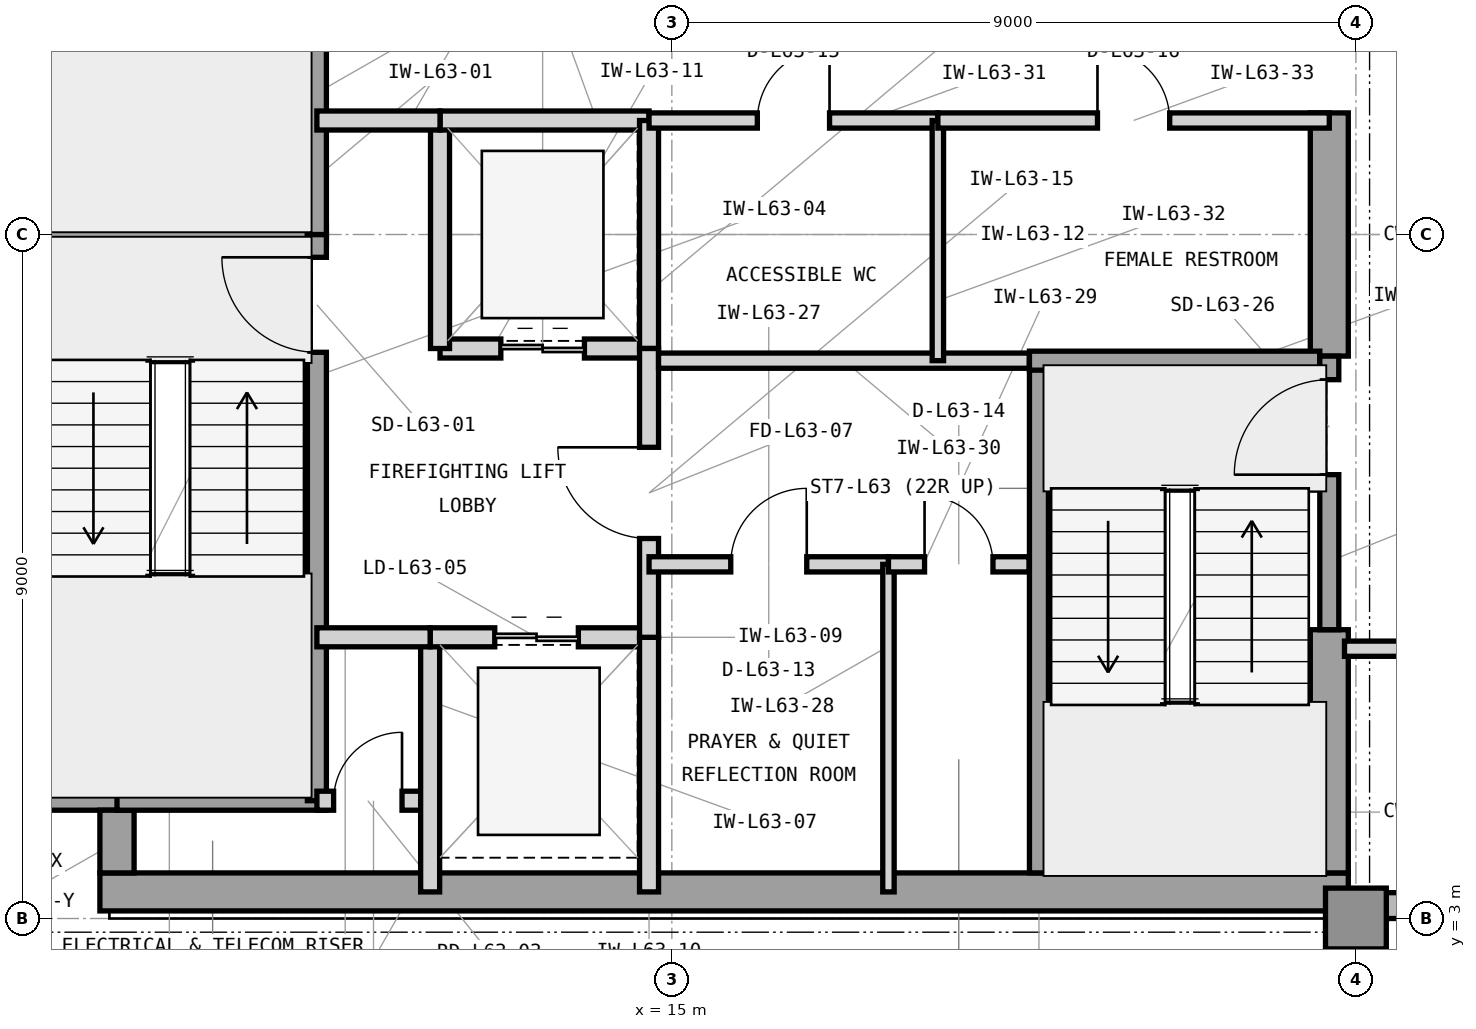
"""IFC4 building model, lengths in metres.
Left out: names, types, materials, properties, quantities, classifications, styles, units other than length and angle.
Written with IfcOpenShell. Run it as: python <this file> out.ifc"""

import sys

from ifc_helpers import new_model, si_unit, direction, frame, frame_2d, origin, origin_2d, place, context, subcontext, project, spatial, rectangle, extrude, element, fill, save


model = new_model("IFC4")
c1 = context("Model", 3, precision=1e-05, world=origin(), true_north=direction((0.0, 1.0)))
c2 = subcontext(c1, "Body", "Model", "MODEL_VIEW")
j1 = project(units=[si_unit("LENGTHUNIT", "METRE"), si_unit("PLANEANGLEUNIT", "RADIAN")], contexts=[c1])
p1 = place(None, origin())
s1 = spatial("IfcSite", under=j1, at=p1, CompositionType="ELEMENT")
p2 = place(p1, origin())
s2 = spatial("IfcBuilding", under=s1, at=p2, CompositionType="ELEMENT")
p3 = place(p2, frame((0.0, 0.0, 258.6)))
s3 = spatial("IfcBuildingStorey", under=s2, at=p3, CompositionType="ELEMENT", Elevation=258.6)
p4 = place(p3, frame((7.475, 3.35, 0.0), z_axis=(0.0, 0.0, 1.0), x_axis=(1.0, 0.0, 0.0)))
e1 = element("IfcWall", 1, at=p4, inside=s3, PredefinedType="SHEAR", context=c2, shape_type="SweptSolid", body=[
    extrude(rectangle(XDim=16.425, YDim=0.5, at=frame_2d((8.212, 0.0))), origin(), (0.0, 0.0, 1.0), 3.9),
])
p5 = place(p3, frame((23.65, 3.6, 0.0), z_axis=(0.0, 0.0, 1.0), x_axis=(0.0, 1.0, 0.0)))
e2 = element("IfcWall", 2, at=p5, inside=s3, PredefinedType="SHEAR", context=c2, shape_type="SweptSolid", body=[
    extrude(rectangle(XDim=3.2, YDim=0.5, at=frame_2d((1.6, 0.0))), origin(), (0.0, 0.0, 1.0), 3.9),
])
p6 = place(p3, frame((23.65, 10.4, 0.0), z_axis=(0.0, 0.0, 1.0), x_axis=(0.0, 1.0, 0.0)))
e3 = element("IfcWall", 3, at=p6, inside=s3, PredefinedType="SHEAR", context=c2, shape_type="SweptSolid", body=[
    extrude(rectangle(XDim=3.2, YDim=0.5, at=frame_2d((1.6, 0.0))), origin(), (0.0, 0.0, 1.0), 3.9),
])
p7 = place(p3, frame((6.6, 4.65, 0.0), z_axis=(0.0, 0.0, 1.0), x_axis=(1.0, 0.0, 0.0)))
e4 = element("IfcWall", 4, at=p7, inside=s3, PredefinedType="SHEAR", context=c2, shape_type="SweptSolid", body=[
    extrude(rectangle(XDim=1.325, YDim=0.45, at=frame_2d((0.663, 0.0))), origin(), (0.0, 0.0, 1.0), 3.9),
])
p8 = place(p3, frame((7.7, 3.6, 0.0), z_axis=(0.0, 0.0, 1.0), x_axis=(0.0, 1.0, 0.0)))
e5 = element("IfcWall", 5, at=p8, inside=s3, PredefinedType="SHEAR", context=c2, shape_type="SweptSolid", body=[
    extrude(rectangle(XDim=0.825, YDim=0.45, at=frame_2d((0.413, 0.0))), origin(), (0.0, 0.0, 1.0), 3.9),
])
p9 = place(p3, frame((24.0, 3.0, 0.0), z_axis=(0.0, 0.0, 1.0), x_axis=(1.0, 0.0, 0.0)))
e6 = element("IfcColumn", 6, at=p9, inside=s3, PredefinedType="COLUMN", context=c2, shape_type="SweptSolid", body=[
    extrude(rectangle(XDim=0.8, YDim=0.8, at=origin_2d()), origin(), (0.0, 0.0, 1.0), 3.9),
])
p10 = place(p3, frame((23.9, 3.17, 0.0), z_axis=(0.0, 0.0, 1.0), x_axis=(1.0, 0.0, 0.0)))
e7 = element("IfcWall", 7, at=p10, inside=s3, PredefinedType="STANDARD", context=c2, shape_type="SweptSolid", body=[
    extrude(rectangle(XDim=28.5, YDim=0.34, at=frame_2d((14.25, 0.0))), origin(), (0.0, 0.0, 1.0), 3.715),
])
p11 = place(p10, frame((1.425, 0.0, 0.8)))
e8 = element("IfcOpeningElement", 8, at=p11, cuts=e7, PredefinedType="OPENING", context=c2, shape_type="SweptSolid", body=[
    extrude(rectangle(XDim=1.9, YDim=2.35, at=frame_2d((0.95, 1.175))), frame((0.0, 0.18, 0.0), z_axis=(0.0, -1.0, 0.0), x_axis=(1.0, 0.0, 0.0)), (0.0, 0.0, 1.0), 0.36),
])
p12 = place(p10, frame((10.575, 0.0, 0.8)))
e9 = element("IfcOpeningElement", 9, at=p12, cuts=e7, PredefinedType="OPENING", context=c2, shape_type="SweptSolid", body=[
    extrude(rectangle(XDim=2.6, YDim=2.35, at=frame_2d((1.3, 1.175))), frame((0.0, 0.18, 0.0), z_axis=(0.0, -1.0, 0.0), x_axis=(1.0, 0.0, 0.0)), (0.0, 0.0, 1.0), 0.36),
])
p13 = place(p10, frame((20.075, 0.0, 0.8)))
e10 = element("IfcOpeningElement", 10, at=p13, cuts=e7, PredefinedType="OPENING", context=c2, shape_type="SweptSolid", body=[
    extrude(rectangle(XDim=2.6, YDim=2.35, at=frame_2d((1.3, 1.175))), frame((0.0, 0.18, 0.0), z_axis=(0.0, -1.0, 0.0), x_axis=(1.0, 0.0, 0.0)), (0.0, 0.0, 1.0), 0.36),
])
p14 = place(p3, frame((6.35, 12.0, 0.0), z_axis=(0.0, 0.0, 1.0), x_axis=(1.0, 0.0, 0.0)))
e11 = element("IfcWall", 11, at=p14, inside=s3, PredefinedType="SHEAR", context=c2, shape_type="SweptSolid", body=[
    extrude(rectangle(XDim=4.105, YDim=0.25, at=frame_2d((2.052, 0.0))), origin(), (0.0, 0.0, 1.0), 3.9),
])
p15 = place(p3, frame((7.7, 4.55, 0.0), z_axis=(0.0, 0.0, 1.0), x_axis=(1.0, 0.0, 0.0)))
e12 = element("IfcWall", 12, at=p15, inside=s3, PredefinedType="SHEAR", context=c2, shape_type="SweptSolid", body=[
    extrude(rectangle(XDim=2.755, YDim=0.25, at=frame_2d((1.377, 0.0))), origin(), (0.0, 0.0, 1.0), 3.9),
])
p16 = place(p3, frame((10.33, 4.55, 0.0), z_axis=(0.0, 0.0, 1.0), x_axis=(0.0, 1.0, 0.0)))
e13 = element("IfcWall", 13, at=p16, inside=s3, PredefinedType="SHEAR", context=c2, shape_type="SweptSolid", body=[
    extrude(rectangle(XDim=7.45, YDim=0.25, at=frame_2d((3.725, 0.0))), origin(), (0.0, 0.0, 1.0), 3.9),
])
p17 = place(p16, frame((5.9, 0.0, 0.0)))
e14 = element("IfcOpeningElement", 14, at=p17, cuts=e13, PredefinedType="OPENING", context=c2, shape_type="SweptSolid", body=[
    extrude(rectangle(XDim=1.25, YDim=2.2, at=frame_2d((0.625, 1.1))), frame((0.0, 0.135, 0.0), z_axis=(0.0, -1.0, 0.0), x_axis=(1.0, 0.0, 0.0)), (0.0, 0.0, 1.0), 0.27),
])
p18 = place(p3, frame((10.33, 12.0, 0.0), z_axis=(0.0, 0.0, 1.0), x_axis=(0.0, 1.0, 0.0)))
e15 = element("IfcWall", 15, at=p18, inside=s3, PredefinedType="SHEAR", context=c2, shape_type="SweptSolid", body=[
    extrude(rectangle(XDim=7.45, YDim=0.25, at=frame_2d((3.725, 0.0))), origin(), (0.0, 0.0, 1.0), 3.9),
])
p19 = place(p18, frame((5.85, 0.0, 0.0)))
e16 = element("IfcOpeningElement", 16, at=p19, cuts=e15, PredefinedType="OPENING", context=c2, shape_type="SweptSolid", body=[
    extrude(rectangle(XDim=1.25, YDim=2.2, at=frame_2d((0.625, 1.1))), frame((0.0, 0.135, 0.0), z_axis=(0.0, -1.0, 0.0), x_axis=(1.0, 0.0, 0.0)), (0.0, 0.0, 1.0), 0.27),
])
p20 = place(p3, frame((10.33, 4.55, 0.0), z_axis=(0.0, 0.0, 1.0), x_axis=(1.0, 0.0, 0.0)))
e17 = element("IfcWall", 17, at=p20, inside=s3, PredefinedType="PARTITIONING", context=c2, shape_type="SweptSolid", body=[
    extrude(rectangle(XDim=1.49, YDim=0.25, at=frame_2d((0.745, 0.0))), origin(), (0.0, 0.0, 1.0), 3.705),
])
p21 = place(p20, frame((0.22, 0.0, 0.0)))
e18 = element("IfcOpeningElement", 18, at=p21, cuts=e17, PredefinedType="OPENING", context=c2, shape_type="SweptSolid", body=[
    extrude(rectangle(XDim=0.9, YDim=2.1, at=frame_2d((0.45, 1.05))), frame((0.0, 0.135, 0.0), z_axis=(0.0, -1.0, 0.0), x_axis=(1.0, 0.0, 0.0)), (0.0, 0.0, 1.0), 0.27),
])
p22 = place(p3, frame((11.82, 3.35, 0.0), z_axis=(0.0, 0.0, 1.0), x_axis=(0.0, 1.0, 0.0)))
e19 = element("IfcWall", 19, at=p22, inside=s3, PredefinedType="PARTITIONING", context=c2, shape_type="SweptSolid", body=[
    extrude(rectangle(XDim=3.35, YDim=0.25, at=frame_2d((1.675, 0.0))), origin(), (0.0, 0.0, 1.0), 3.705),
])
p23 = place(p3, frame((11.82, 6.7, 0.0), z_axis=(0.0, 0.0, 1.0), x_axis=(1.0, 0.0, 0.0)))
e20 = element("IfcWall", 20, at=p23, inside=s3, PredefinedType="PARTITIONING", context=c2, shape_type="SweptSolid", body=[
    extrude(rectangle(XDim=2.88, YDim=0.25, at=frame_2d((1.44, 0.0))), origin(), (0.0, 0.0, 1.0), 3.088),
])
p24 = place(p23, frame((0.85, 0.0, 0.0)))
e21 = element("IfcOpeningElement", 21, at=p24, cuts=e20, PredefinedType="OPENING", context=c2, shape_type="SweptSolid", body=[
    extrude(rectangle(XDim=1.1, YDim=2.25, at=frame_2d((0.55, 1.125))), frame((0.0, 0.135, 0.0), z_axis=(0.0, -1.0, 0.0), x_axis=(1.0, 0.0, 0.0)), (0.0, 0.0, 1.0), 0.27),
])
p25 = place(p3, frame((14.7, 3.35, 0.0), z_axis=(0.0, 0.0, 1.0), x_axis=(0.0, 1.0, 0.0)))
e22 = element("IfcWall", 22, at=p25, inside=s3, PredefinedType="PARTITIONING", context=c2, shape_type="SweptSolid", body=[
    extrude(rectangle(XDim=3.35, YDim=0.25, at=frame_2d((1.675, 0.0))), origin(), (0.0, 0.0, 1.0), 3.705),
])
p26 = place(p3, frame((11.95, 10.5, 0.0), z_axis=(0.0, 0.0, 1.0), x_axis=(1.0, 0.0, 0.0)))
e23 = element("IfcWall", 23, at=p26, inside=s3, PredefinedType="PARTITIONING", context=c2, shape_type="SweptSolid", body=[
    extrude(rectangle(XDim=2.75, YDim=0.25, at=frame_2d((1.375, 0.0))), origin(), (0.0, 0.0, 1.0), 3.088),
])
p27 = place(p26, frame((0.8, 0.0, 0.0)))
e24 = element("IfcOpeningElement", 24, at=p27, cuts=e23, PredefinedType="OPENING", context=c2, shape_type="SweptSolid", body=[
    extrude(rectangle(XDim=1.1, YDim=2.25, at=frame_2d((0.55, 1.125))), frame((0.0, 0.135, 0.0), z_axis=(0.0, -1.0, 0.0), x_axis=(1.0, 0.0, 0.0)), (0.0, 0.0, 1.0), 0.27),
])
p28 = place(p3, frame((11.95, 10.5, 0.0), z_axis=(0.0, 0.0, 1.0), x_axis=(0.0, 1.0, 0.0)))
e25 = element("IfcWall", 25, at=p28, inside=s3, PredefinedType="PARTITIONING", context=c2, shape_type="SweptSolid", body=[
    extrude(rectangle(XDim=3.0, YDim=0.25, at=frame_2d((1.5, 0.0))), origin(), (0.0, 0.0, 1.0), 3.705),
])
p29 = place(p3, frame((11.95, 13.5, 0.0), z_axis=(0.0, 0.0, 1.0), x_axis=(1.0, 0.0, 0.0)))
e26 = element("IfcWall", 26, at=p29, inside=s3, PredefinedType="PARTITIONING", context=c2, shape_type="SweptSolid", body=[
    extrude(rectangle(XDim=2.75, YDim=0.25, at=frame_2d((1.375, 0.0))), origin(), (0.0, 0.0, 1.0), 3.088),
])
p30 = place(p3, frame((14.7, 10.5, 0.0), z_axis=(0.0, 0.0, 1.0), x_axis=(0.0, 1.0, 0.0)))
e27 = element("IfcWall", 27, at=p30, inside=s3, PredefinedType="PARTITIONING", context=c2, shape_type="SweptSolid", body=[
    extrude(rectangle(XDim=3.0, YDim=0.25, at=frame_2d((1.5, 0.0))), origin(), (0.0, 0.0, 1.0), 3.705),
])
p31 = place(p3, frame((14.7, 6.7, 0.0), z_axis=(0.0, 0.0, 1.0), x_axis=(0.0, 1.0, 0.0)))
e28 = element("IfcWall", 28, at=p31, inside=s3, PredefinedType="PARTITIONING", context=c2, shape_type="SweptSolid", body=[
    extrude(rectangle(XDim=3.8, YDim=0.25, at=frame_2d((1.9, 0.0))), origin(), (0.0, 0.0, 1.0), 3.705),
])
p32 = place(p31, frame((1.3, 0.0, 0.0)))
e29 = element("IfcOpeningElement", 29, at=p32, cuts=e28, PredefinedType="OPENING", context=c2, shape_type="SweptSolid", body=[
    extrude(rectangle(XDim=1.2, YDim=2.2, at=frame_2d((0.6, 1.1))), frame((0.0, 0.135, 0.0), z_axis=(0.0, -1.0, 0.0), x_axis=(1.0, 0.0, 0.0)), (0.0, 0.0, 1.0), 0.27),
])
p33 = place(p3, frame((10.33, 13.5, 0.0), z_axis=(0.0, 0.0, 1.0), x_axis=(1.0, 0.0, 0.0)))
e30 = element("IfcWall", 30, at=p33, inside=s3, PredefinedType="PARTITIONING", context=c2, shape_type="SweptSolid", body=[
    extrude(rectangle(XDim=1.62, YDim=0.25, at=frame_2d((0.81, 0.0))), origin(), (0.0, 0.0, 1.0), 3.088),
])
p34 = place(p3, frame((10.33, 6.7, 0.0), z_axis=(0.0, 0.0, 1.0), x_axis=(1.0, 0.0, 0.0)))
e31 = element("IfcWall", 31, at=p34, inside=s3, PredefinedType="PARTITIONING", context=c2, shape_type="SweptSolid", body=[
    extrude(rectangle(XDim=1.49, YDim=0.25, at=frame_2d((0.745, 0.0))), origin(), (0.0, 0.0, 1.0), 3.088),
])
p35 = place(p3, frame((14.7, 7.66, 0.0), z_axis=(0.0, 0.0, 1.0), x_axis=(1.0, 0.0, 0.0)))
e32 = element("IfcWall", 32, at=p35, inside=s3, PredefinedType="PARTITIONING", context=c2, shape_type="SweptSolid", body=[
    extrude(rectangle(XDim=3.15, YDim=0.2, at=frame_2d((1.575, 0.0))), origin(), (0.0, 0.0, 1.0), 3.705),
])
p36 = place(p35, frame((1.075, 0.0, 0.0)))
e33 = element("IfcOpeningElement", 33, at=p36, cuts=e32, PredefinedType="OPENING", context=c2, shape_type="SweptSolid", body=[
    extrude(rectangle(XDim=1.0, YDim=2.15, at=frame_2d((0.5, 1.075))), frame((0.0, 0.11, 0.0), z_axis=(0.0, -1.0, 0.0), x_axis=(1.0, 0.0, 0.0)), (0.0, 0.0, 1.0), 0.22),
])
p37 = place(p3, frame((17.85, 3.35, 0.0), z_axis=(0.0, 0.0, 1.0), x_axis=(0.0, 1.0, 0.0)))
e34 = element("IfcWall", 34, at=p37, inside=s3, PredefinedType="PARTITIONING", context=c2, shape_type="SweptSolid", body=[
    extrude(rectangle(XDim=4.31, YDim=0.15, at=frame_2d((2.155, 0.0))), origin(), (0.0, 0.0, 1.0), 3.705),
])
p38 = place(p3, frame((17.85, 7.66, 0.0), z_axis=(0.0, 0.0, 1.0), x_axis=(1.0, 0.0, 0.0)))
e35 = element("IfcWall", 35, at=p38, inside=s3, PredefinedType="PARTITIONING", context=c2, shape_type="SweptSolid", body=[
    extrude(rectangle(XDim=1.85, YDim=0.2, at=frame_2d((0.925, 0.0))), origin(), (0.0, 0.0, 1.0), 3.705),
])
p39 = place(p38, frame((0.475, 0.0, 0.0)))
e36 = element("IfcOpeningElement", 36, at=p39, cuts=e35, PredefinedType="OPENING", context=c2, shape_type="SweptSolid", body=[
    extrude(rectangle(XDim=0.9, YDim=2.1, at=frame_2d((0.45, 1.05))), frame((0.0, 0.11, 0.0), z_axis=(0.0, -1.0, 0.0), x_axis=(1.0, 0.0, 0.0)), (0.0, 0.0, 1.0), 0.22),
])
p40 = place(p3, frame((14.825, 10.34, 0.0), z_axis=(0.0, 0.0, 1.0), x_axis=(1.0, 0.0, 0.0)))
e37 = element("IfcWall", 37, at=p40, inside=s3, PredefinedType="PARTITIONING", context=c2, shape_type="SweptSolid", body=[
    extrude(rectangle(XDim=4.88, YDim=0.2, at=frame_2d((2.44, 0.0))), origin(), (0.0, 0.0, 1.0), 3.088),
])
p41 = place(p3, frame((14.7, 13.5, 0.0), z_axis=(0.0, 0.0, 1.0), x_axis=(1.0, 0.0, 0.0)))
e38 = element("IfcWall", 38, at=p41, inside=s3, PredefinedType="PARTITIONING", context=c2, shape_type="SweptSolid", body=[
    extrude(rectangle(XDim=3.8, YDim=0.2, at=frame_2d((1.9, 0.0))), origin(), (0.0, 0.0, 1.0), 3.088),
])
p42 = place(p41, frame((1.425, 0.0, 0.0)))
e39 = element("IfcOpeningElement", 39, at=p42, cuts=e38, PredefinedType="OPENING", context=c2, shape_type="SweptSolid", body=[
    extrude(rectangle(XDim=0.95, YDim=2.1, at=frame_2d((0.475, 1.05))), frame((0.0, 0.11, 0.0), z_axis=(0.0, -1.0, 0.0), x_axis=(1.0, 0.0, 0.0)), (0.0, 0.0, 1.0), 0.22),
])
p43 = place(p3, frame((18.5, 10.34, 0.0), z_axis=(0.0, 0.0, 1.0), x_axis=(0.0, 1.0, 0.0)))
e40 = element("IfcWall", 40, at=p43, inside=s3, PredefinedType="PARTITIONING", context=c2, shape_type="SweptSolid", body=[
    extrude(rectangle(XDim=3.16, YDim=0.15, at=frame_2d((1.58, 0.0))), origin(), (0.0, 0.0, 1.0), 3.705),
])
p44 = place(p3, frame((18.5, 13.5, 0.0), z_axis=(0.0, 0.0, 1.0), x_axis=(1.0, 0.0, 0.0)))
e41 = element("IfcWall", 41, at=p44, inside=s3, PredefinedType="PARTITIONING", context=c2, shape_type="SweptSolid", body=[
    extrude(rectangle(XDim=5.15, YDim=0.2, at=frame_2d((2.575, 0.0))), origin(), (0.0, 0.0, 1.0), 3.088),
])
p45 = place(p44, frame((2.1, 0.0, 0.0)))
e42 = element("IfcOpeningElement", 42, at=p45, cuts=e41, PredefinedType="OPENING", context=c2, shape_type="SweptSolid", body=[
    extrude(rectangle(XDim=0.95, YDim=2.1, at=frame_2d((0.475, 1.05))), frame((0.0, 0.11, 0.0), z_axis=(0.0, -1.0, 0.0), x_axis=(1.0, 0.0, 0.0)), (0.0, 0.0, 1.0), 0.22),
])
p46 = place(p3, frame((23.85, 6.55, 0.0), z_axis=(0.0, 0.0, 1.0), x_axis=(1.0, 0.0, 0.0)))
e43 = element("IfcWall", 43, at=p46, inside=s3, PredefinedType="PARTITIONING", context=c2, shape_type="SweptSolid", body=[
    extrude(rectangle(XDim=7.35, YDim=0.2, at=frame_2d((3.675, 0.0))), origin(), (0.0, 0.0, 1.0), 3.705),
])
p47 = place(p46, frame((2.8, 0.0, 0.0)))
e44 = element("IfcOpeningElement", 44, at=p47, cuts=e43, PredefinedType="OPENING", context=c2, shape_type="SweptSolid", body=[
    extrude(rectangle(XDim=1.0, YDim=2.15, at=frame_2d((0.5, 1.075))), frame((0.0, 0.11, 0.0), z_axis=(0.0, -1.0, 0.0), x_axis=(1.0, 0.0, 0.0)), (0.0, 0.0, 1.0), 0.22),
])
p48 = place(p3, frame((19.83, 3.6, 0.0), z_axis=(0.0, 0.0, 1.0), x_axis=(0.0, 1.0, 0.0)))
e45 = element("IfcWall", 45, at=p48, inside=s3, PredefinedType="SHEAR", context=c2, shape_type="SweptSolid", body=[
    extrude(rectangle(XDim=6.74, YDim=0.25, at=frame_2d((3.37, 0.0))), origin(), (0.0, 0.0, 1.0), 3.9),
])
p49 = place(p3, frame((19.705, 10.34, 0.0), z_axis=(0.0, 0.0, 1.0), x_axis=(1.0, 0.0, 0.0)))
e46 = element("IfcWall", 46, at=p49, inside=s3, PredefinedType="SHEAR", context=c2, shape_type="SweptSolid", body=[
    extrude(rectangle(XDim=3.82, YDim=0.25, at=frame_2d((1.91, 0.0))), origin(), (0.0, 0.0, 1.0), 3.9),
])
p50 = place(p3, frame((23.65, 6.8, 0.0), z_axis=(0.0, 0.0, 1.0), x_axis=(0.0, 1.0, 0.0)))
e47 = element("IfcWall", 47, at=p50, inside=s3, PredefinedType="SHEAR", context=c2, shape_type="SweptSolid", body=[
    extrude(rectangle(XDim=3.6, YDim=0.25, at=frame_2d((1.8, 0.0))), origin(), (0.0, 0.0, 1.0), 3.9),
])
p51 = place(p50, frame((2.04, 0.0, 0.0)))
e48 = element("IfcOpeningElement", 48, at=p51, cuts=e47, PredefinedType="OPENING", context=c2, shape_type="SweptSolid", body=[
    extrude(rectangle(XDim=1.25, YDim=2.2, at=frame_2d((0.625, 1.1))), frame((0.0, 0.135, 0.0), z_axis=(0.0, -1.0, 0.0), x_axis=(1.0, 0.0, 0.0)), (0.0, 0.0, 1.0), 0.27),
])
p52 = place(p17, origin())
e49 = element("IfcDoor", 49, at=p52, inside=s3, OperationType="SINGLE_SWING_RIGHT", PredefinedType="DOOR", context=c2, shape_type="SweptSolid", body=[
    extrude(rectangle(XDim=1.25, YDim=2.2, at=frame_2d((0.625, 1.1))), frame((0.0, 0.025, 0.0), z_axis=(0.0, -1.0, 0.0), x_axis=(1.0, 0.0, 0.0)), (0.0, 0.0, 1.0), 0.05),
])
fill(e14, e49)
p53 = place(p21, origin())
e50 = element("IfcDoor", 50, at=p53, inside=s3, OperationType="SINGLE_SWING_RIGHT", PredefinedType="TRAPDOOR", context=c2, shape_type="SweptSolid", body=[
    extrude(rectangle(XDim=0.9, YDim=2.1, at=frame_2d((0.45, 1.05))), frame((0.0, 0.025, 0.0), z_axis=(0.0, -1.0, 0.0), x_axis=(1.0, 0.0, 0.0)), (0.0, 0.0, 1.0), 0.05),
])
fill(e18, e50)
p54 = place(p24, origin())
e51 = element("IfcDoor", 51, at=p54, inside=s3, OperationType="DOUBLE_DOOR_SLIDING", PredefinedType="DOOR", context=c2, shape_type="SweptSolid", body=[
    extrude(rectangle(XDim=1.1, YDim=2.25, at=frame_2d((0.55, 1.125))), frame((0.0, 0.025, 0.0), z_axis=(0.0, -1.0, 0.0), x_axis=(1.0, 0.0, 0.0)), (0.0, 0.0, 1.0), 0.05),
])
fill(e21, e51)
p55 = place(p27, origin())
e52 = element("IfcDoor", 52, at=p55, inside=s3, OperationType="DOUBLE_DOOR_SLIDING", PredefinedType="DOOR", context=c2, shape_type="SweptSolid", body=[
    extrude(rectangle(XDim=1.1, YDim=2.25, at=frame_2d((0.55, 1.125))), frame((0.0, 0.025, 0.0), z_axis=(0.0, -1.0, 0.0), x_axis=(1.0, 0.0, 0.0)), (0.0, 0.0, 1.0), 0.05),
])
fill(e24, e52)
p56 = place(p32, origin())
e53 = element("IfcDoor", 53, at=p56, inside=s3, OperationType="SINGLE_SWING_RIGHT", PredefinedType="DOOR", context=c2, shape_type="SweptSolid", body=[
    extrude(rectangle(XDim=1.2, YDim=2.2, at=frame_2d((0.6, 1.1))), frame((0.0, 0.025, 0.0), z_axis=(0.0, -1.0, 0.0), x_axis=(1.0, 0.0, 0.0)), (0.0, 0.0, 1.0), 0.05),
])
fill(e29, e53)
p57 = place(p36, origin())
e54 = element("IfcDoor", 54, at=p57, inside=s3, OperationType="SINGLE_SWING_RIGHT", PredefinedType="DOOR", context=c2, shape_type="SweptSolid", body=[
    extrude(rectangle(XDim=1.0, YDim=2.15, at=frame_2d((0.5, 1.075))), frame((0.0, 0.025, 0.0), z_axis=(0.0, -1.0, 0.0), x_axis=(1.0, 0.0, 0.0)), (0.0, 0.0, 1.0), 0.05),
])
fill(e33, e54)
p58 = place(p39, origin())
e55 = element("IfcDoor", 55, at=p58, inside=s3, OperationType="SINGLE_SWING_LEFT", PredefinedType="TRAPDOOR", context=c2, shape_type="SweptSolid", body=[
    extrude(rectangle(XDim=0.9, YDim=2.1, at=frame_2d((0.45, 1.05))), frame((0.0, 0.025, 0.0), z_axis=(0.0, -1.0, 0.0), x_axis=(1.0, 0.0, 0.0)), (0.0, 0.0, 1.0), 0.05),
])
fill(e36, e55)
p59 = place(p42, origin())
e56 = element("IfcDoor", 56, at=p59, inside=s3, OperationType="SINGLE_SWING_RIGHT", PredefinedType="DOOR", context=c2, shape_type="SweptSolid", body=[
    extrude(rectangle(XDim=0.95, YDim=2.1, at=frame_2d((0.475, 1.05))), frame((0.0, 0.025, 0.0), z_axis=(0.0, -1.0, 0.0), x_axis=(1.0, 0.0, 0.0)), (0.0, 0.0, 1.0), 0.05),
])
fill(e39, e56)
p60 = place(p45, origin())
e57 = element("IfcDoor", 57, at=p60, inside=s3, OperationType="SINGLE_SWING_LEFT", PredefinedType="DOOR", context=c2, shape_type="SweptSolid", body=[
    extrude(rectangle(XDim=0.95, YDim=2.1, at=frame_2d((0.475, 1.05))), frame((0.0, 0.025, 0.0), z_axis=(0.0, -1.0, 0.0), x_axis=(1.0, 0.0, 0.0)), (0.0, 0.0, 1.0), 0.05),
])
fill(e42, e57)
p61 = place(p51, origin())
e58 = element("IfcDoor", 58, at=p61, inside=s3, OperationType="SINGLE_SWING_LEFT", PredefinedType="DOOR", context=c2, shape_type="SweptSolid", body=[
    extrude(rectangle(XDim=1.25, YDim=2.2, at=frame_2d((0.625, 1.1))), frame((0.0, 0.025, 0.0), z_axis=(0.0, -1.0, 0.0), x_axis=(1.0, 0.0, 0.0)), (0.0, 0.0, 1.0), 0.05),
])
fill(e48, e58)
save(model, sys.argv[1])
